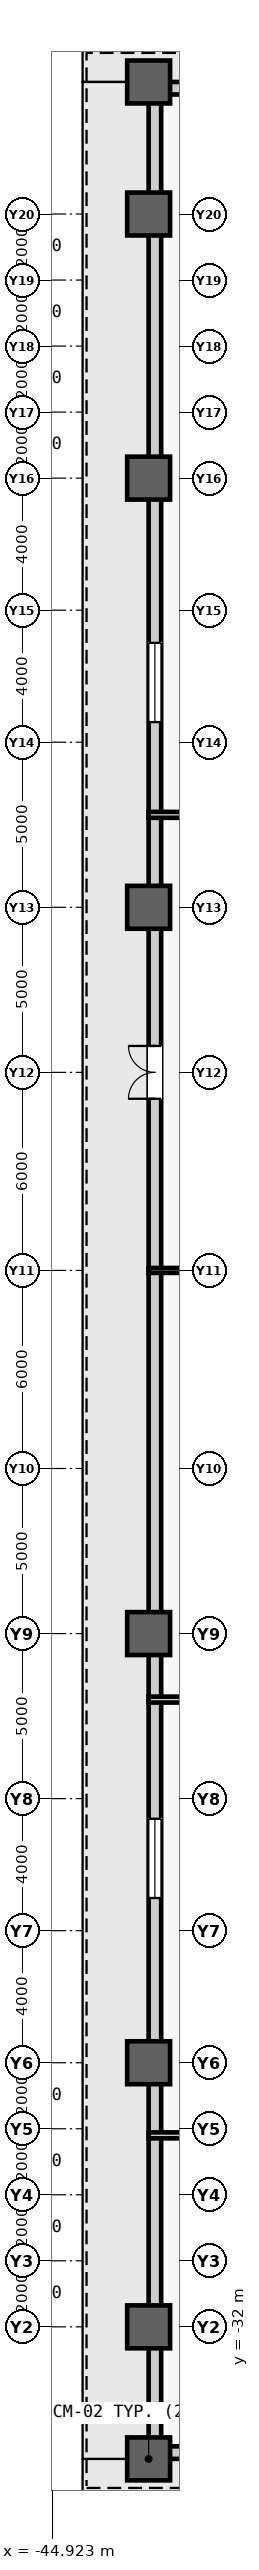
"""IFC4 building model, lengths in metres.
Left out: names, types, materials, properties, quantities, classifications, styles, units other than length and angle.
Written with IfcOpenShell. Run it as: python <this file> out.ifc"""

import sys

from ifc_helpers import new_model, si_unit, direction, frame, frame_2d, origin, origin_2d, place, context, subcontext, project, spatial, rectangle, extrude, source, transform, mapped, element, fill, save


model = new_model("IFC4")
c1 = context("Model", 3, precision=1e-05, world=origin(), true_north=direction((0.0, 1.0)))
c2 = subcontext(c1, "Body", "Model", "MODEL_VIEW")
j1 = project(units=[si_unit("LENGTHUNIT", "METRE"), si_unit("PLANEANGLEUNIT", "RADIAN")], contexts=[c1])
p1 = place(None, origin())
s1 = spatial("IfcSite", under=j1, at=p1, CompositionType="ELEMENT")
p2 = place(p1, origin())
s2 = spatial("IfcBuilding", under=s1, at=p2, CompositionType="ELEMENT")
p3 = place(p2, frame((0.0, 0.0, 12.0)))
s3 = spatial("IfcBuildingStorey", under=s2, at=p3, CompositionType="ELEMENT", Elevation=12.0)
m1 = source(origin(), c2, "Body", "SweptSolid", [
    extrude(rectangle(XDim=1.3, YDim=1.3, at=origin_2d()), origin(), (0.0, 0.0, 1.0), 5.4),
])
for number, where, z_axis, x_axis in (
    (1, (-42.0, -36.0, 0.0), (0.0, 0.0, 1.0), (1.0, 0.0, 0.0)),
    (2, (-42.0, -24.0, 0.0), (0.0, 0.0, 1.0), (1.0, 0.0, 0.0)),
    (3, (-42.0, -11.0, 0.0), (0.0, 0.0, 1.0), (1.0, 0.0, 0.0)),
    (4, (-42.0, 11.0, 0.0), (0.0, 0.0, 1.0), (1.0, 0.0, 0.0)),
    (5, (-42.0, 24.0, 0.0), (0.0, 0.0, 1.0), (1.0, 0.0, 0.0)),
    (6, (-42.0, 36.0, 0.0), (0.0, 0.0, 1.0), (1.0, 0.0, 0.0)),
    (7, (-42.0, -32.0, 0.0), (0.0, 0.0, 1.0), (1.0, 0.0, 0.0)),
    (8, (-42.0, 32.0, 0.0), (0.0, 0.0, 1.0), (1.0, 0.0, 0.0)),
):
    element("IfcColumn", number, at=place(p3, frame(where, z_axis=z_axis, x_axis=x_axis)), inside=s3, PredefinedType="COLUMN", context=c2, shape_type="MappedRepresentation", body=[
        mapped(m1, transform((0.0, 0.0, 0.0), scale=1.0)),
    ])
m2 = source(origin(), c2, "Body", "SweptSolid", [
    extrude(rectangle(XDim=32.0, YDim=0.38, at=frame_2d((16.0, 0.0))), origin(), (0.0, 0.0, 1.0), 3.28),
])
p4 = place(p3, frame((-42.0, -35.81, 0.0), z_axis=(0.0, 0.0, 1.0), x_axis=(1.0, 0.0, 0.0)))
e9 = element("IfcWall", 9, at=p4, inside=s3, PredefinedType="STANDARD", context=c2, shape_type="MappedRepresentation", body=[
    mapped(m2, transform((0.0, 0.0, 0.0), scale=1.0)),
])
m3 = source(origin(), c2, "Body", "SweptSolid", [
    extrude(rectangle(XDim=1.6, YDim=2.25, at=frame_2d((0.8, 1.125))), frame((0.0, 0.2, 0.0), z_axis=(0.0, -1.0, 0.0), x_axis=(1.0, 0.0, 0.0)), (0.0, 0.0, 1.0), 0.4),
])
p5 = place(p4, frame((14.2, 0.0, 0.0)))
e10 = element("IfcOpeningElement", 10, at=p5, cuts=e9, PredefinedType="OPENING", context=c2, shape_type="MappedRepresentation", body=[
    mapped(m3, transform((0.0, 0.0, 0.0), scale=1.0)),
])
m4 = source(origin(), c2, "Body", "SweptSolid", [
    extrude(rectangle(XDim=2.4, YDim=2.56, at=frame_2d((1.2, 1.28))), frame((0.0, 0.2, 0.0), z_axis=(0.0, -1.0, 0.0), x_axis=(1.0, 0.0, 0.0)), (0.0, 0.0, 1.0), 0.4),
])
p6 = place(p4, frame((22.8, 0.0, 0.5)))
e11 = element("IfcOpeningElement", 11, at=p6, cuts=e9, PredefinedType="OPENING", context=c2, shape_type="MappedRepresentation", body=[
    mapped(m4, transform((0.0, 0.0, 0.0), scale=1.0)),
])
p7 = place(p3, frame((-42.0, 35.81, 0.0), z_axis=(0.0, 0.0, 1.0), x_axis=(1.0, 0.0, 0.0)))
e12 = element("IfcWall", 12, at=p7, inside=s3, PredefinedType="STANDARD", context=c2, shape_type="MappedRepresentation", body=[
    mapped(m2, transform((0.0, 0.0, 0.0), scale=1.0)),
])
p8 = place(p7, frame((14.2, 0.0, 0.0)))
e13 = element("IfcOpeningElement", 13, at=p8, cuts=e12, PredefinedType="OPENING", context=c2, shape_type="MappedRepresentation", body=[
    mapped(m3, transform((0.0, 0.0, 0.0), scale=1.0)),
])
m5 = source(origin(), c2, "Body", "SweptSolid", [
    extrude(rectangle(XDim=71.24, YDim=0.38, at=frame_2d((35.62, 0.0))), origin(), (0.0, 0.0, 1.0), 3.28),
])
p9 = place(p3, frame((-41.81, -35.62, 0.0), z_axis=(0.0, 0.0, 1.0), x_axis=(0.0, 1.0, 0.0)))
e14 = element("IfcWall", 14, at=p9, inside=s3, PredefinedType="STANDARD", context=c2, shape_type="MappedRepresentation", body=[
    mapped(m5, transform((0.0, 0.0, 0.0), scale=1.0)),
])
p10 = place(p9, frame((40.82, 0.0, 0.0)))
e15 = element("IfcOpeningElement", 15, at=p10, cuts=e14, PredefinedType="OPENING", context=c2, shape_type="MappedRepresentation", body=[
    mapped(m3, transform((0.0, 0.0, 0.0), scale=1.0)),
])
p11 = place(p9, frame((16.61, 0.0, 0.5)))
e16 = element("IfcOpeningElement", 16, at=p11, cuts=e14, PredefinedType="OPENING", context=c2, shape_type="MappedRepresentation", body=[
    mapped(m4, transform((0.0, 0.0, 0.0), scale=1.0)),
])
p12 = place(p9, frame((52.23, 0.0, 0.5)))
e17 = element("IfcOpeningElement", 17, at=p12, cuts=e14, PredefinedType="OPENING", context=c2, shape_type="MappedRepresentation", body=[
    mapped(m4, transform((0.0, 0.0, 0.0), scale=1.0)),
])
m6 = source(origin(), c2, "Body", "SweptSolid", [
    extrude(rectangle(XDim=84.0, YDim=0.18, at=frame_2d((42.0, 0.0))), origin(), (0.0, 0.0, 1.0), 5.08),
])
p13 = place(p3, frame((-42.0, -26.2, 0.0), z_axis=(0.0, 0.0, 1.0), x_axis=(1.0, 0.0, 0.0)))
e18 = element("IfcWall", 18, at=p13, inside=s3, PredefinedType="PARTITIONING", context=c2, shape_type="MappedRepresentation", body=[
    mapped(m6, transform((0.0, 0.0, 0.0), scale=1.0)),
])
m7 = source(origin(), c2, "Body", "SweptSolid", [
    extrude(rectangle(XDim=1.05, YDim=2.2, at=frame_2d((0.525, 1.1))), frame((0.0, 0.1, 0.0), z_axis=(0.0, -1.0, 0.0), x_axis=(1.0, 0.0, 0.0)), (0.0, 0.0, 1.0), 0.2),
])
p14 = place(p13, frame((21.725, 0.0, 0.0)))
e19 = element("IfcOpeningElement", 19, at=p14, cuts=e18, PredefinedType="OPENING", context=c2, shape_type="MappedRepresentation", body=[
    mapped(m7, transform((0.0, 0.0, 0.0), scale=1.0)),
])
p15 = place(p13, frame((43.475, 0.0, 0.0)))
e20 = element("IfcOpeningElement", 20, at=p15, cuts=e18, PredefinedType="OPENING", context=c2, shape_type="MappedRepresentation", body=[
    mapped(m7, transform((0.0, 0.0, 0.0), scale=1.0)),
])
p16 = place(p13, frame((63.225, 0.0, 0.0)))
e21 = element("IfcOpeningElement", 21, at=p16, cuts=e18, PredefinedType="OPENING", context=c2, shape_type="MappedRepresentation", body=[
    mapped(m7, transform((0.0, 0.0, 0.0), scale=1.0)),
])
p17 = place(p3, frame((-42.0, 13.8, 0.0), z_axis=(0.0, 0.0, 1.0), x_axis=(1.0, 0.0, 0.0)))
e22 = element("IfcWall", 22, at=p17, inside=s3, PredefinedType="PARTITIONING", context=c2, shape_type="MappedRepresentation", body=[
    mapped(m6, transform((0.0, 0.0, 0.0), scale=1.0)),
])
p18 = place(p17, frame((17.725, 0.0, 0.0)))
e23 = element("IfcOpeningElement", 23, at=p18, cuts=e22, PredefinedType="OPENING", context=c2, shape_type="MappedRepresentation", body=[
    mapped(m7, transform((0.0, 0.0, 0.0), scale=1.0)),
])
p19 = place(p17, frame((35.475, 0.0, 0.0)))
e24 = element("IfcOpeningElement", 24, at=p19, cuts=e22, PredefinedType="OPENING", context=c2, shape_type="MappedRepresentation", body=[
    mapped(m7, transform((0.0, 0.0, 0.0), scale=1.0)),
])
p20 = place(p17, frame((59.225, 0.0, 0.0)))
e25 = element("IfcOpeningElement", 25, at=p20, cuts=e22, PredefinedType="OPENING", context=c2, shape_type="MappedRepresentation", body=[
    mapped(m7, transform((0.0, 0.0, 0.0), scale=1.0)),
])
m8 = source(origin(), c2, "Body", "SweptSolid", [
    extrude(rectangle(XDim=23.8, YDim=0.18, at=frame_2d((11.9, 0.0))), origin(), (0.0, 0.0, 1.0), 5.08),
])
p21 = place(p3, frame((-42.0, -13.0, 0.0), z_axis=(0.0, 0.0, 1.0), x_axis=(1.0, 0.0, 0.0)))
e26 = element("IfcWall", 26, at=p21, inside=s3, PredefinedType="PARTITIONING", context=c2, shape_type="MappedRepresentation", body=[
    mapped(m8, transform((0.0, 0.0, 0.0), scale=1.0)),
])
m9 = source(origin(), c2, "Body", "SweptSolid", [
    extrude(rectangle(XDim=23.8, YDim=0.15, at=frame_2d((11.9, 0.0))), origin(), (0.0, 0.0, 1.0), 3.28),
])
p22 = place(p3, frame((-42.0, 0.0, 0.0), z_axis=(0.0, 0.0, 1.0), x_axis=(1.0, 0.0, 0.0)))
e27 = element("IfcWall", 27, at=p22, inside=s3, PredefinedType="PARTITIONING", context=c2, shape_type="MappedRepresentation", body=[
    mapped(m9, transform((0.0, 0.0, 0.0), scale=1.0)),
])
m10 = source(origin(), c2, "Body", "SweptSolid", [
    extrude(rectangle(XDim=1.6, YDim=2.25, at=frame_2d((0.8, 1.125))), frame((0.0, 0.025, 0.0), z_axis=(0.0, -1.0, 0.0), x_axis=(1.0, 0.0, 0.0)), (0.0, 0.0, 1.0), 0.05),
])
p23 = place(p10, origin())
e28 = element("IfcDoor", 28, at=p23, inside=s3, OperationType="DOUBLE_DOOR_SINGLE_SWING", PredefinedType="DOOR", context=c2, shape_type="MappedRepresentation", body=[
    mapped(m10, transform((0.0, 0.0, 0.0), scale=1.0)),
])
fill(e15, e28)
m11 = source(origin(), c2, "Body", "SweptSolid", [
    extrude(rectangle(XDim=2.4, YDim=2.56, at=frame_2d((1.2, 1.28))), frame((0.0, 0.03, 0.0), z_axis=(0.0, -1.0, 0.0), x_axis=(1.0, 0.0, 0.0)), (0.0, 0.0, 1.0), 0.06),
])
p24 = place(p11, origin())
e29 = element("IfcWindow", 29, at=p24, inside=s3, PartitioningType="SINGLE_PANEL", PredefinedType="WINDOW", context=c2, shape_type="MappedRepresentation", body=[
    mapped(m11, transform((0.0, 0.0, 0.0), scale=1.0)),
])
fill(e16, e29)
p25 = place(p12, origin())
e30 = element("IfcWindow", 30, at=p25, inside=s3, PartitioningType="SINGLE_PANEL", PredefinedType="WINDOW", context=c2, shape_type="MappedRepresentation", body=[
    mapped(m11, transform((0.0, 0.0, 0.0), scale=1.0)),
])
fill(e17, e30)
save(model, sys.argv[1])
